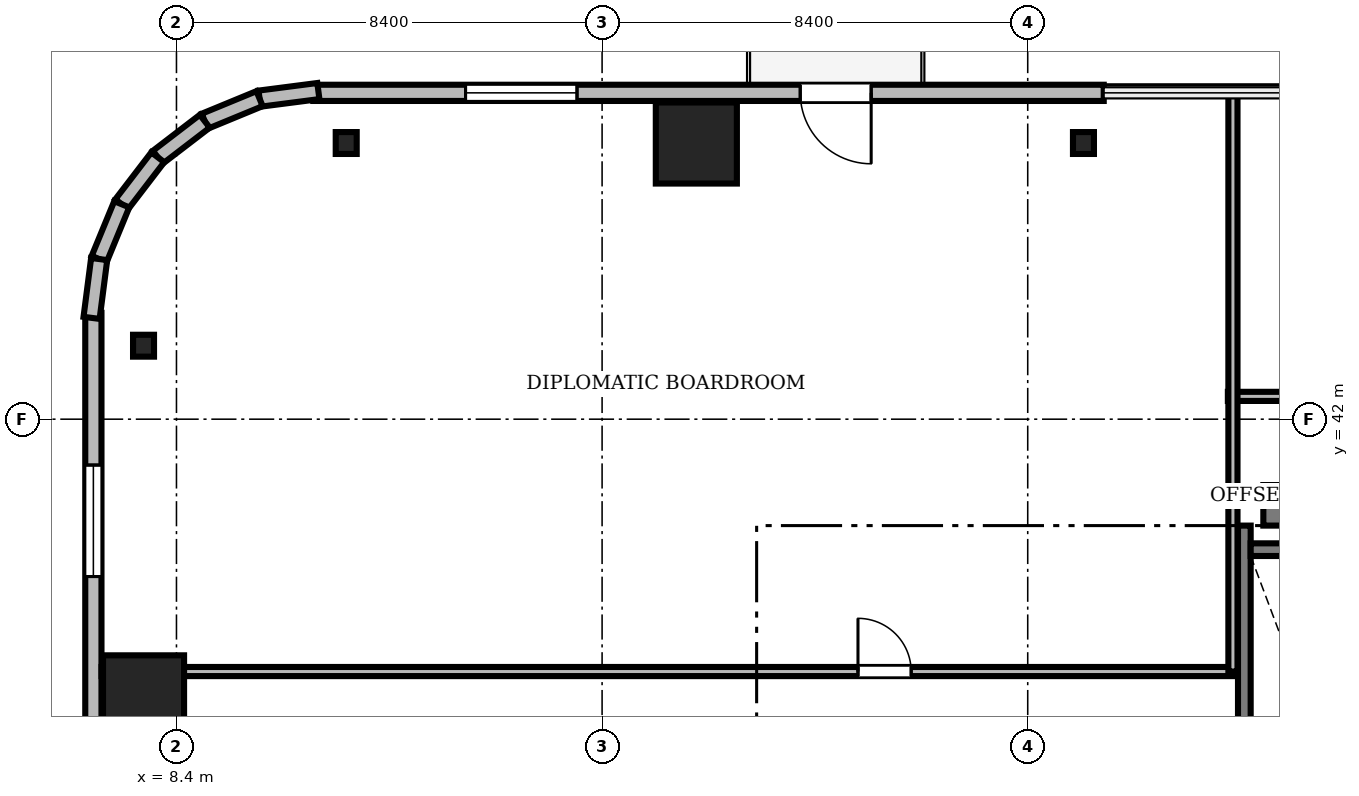
"""IFC4 building model, lengths in metres.
Left out: names, types, materials, properties, quantities, classifications, styles, units other than length and angle.
Written with IfcOpenShell. Run it as: python <this file> out.ifc"""

import sys

from ifc_helpers import new_model, si_unit, direction, frame, frame_2d, origin, origin_2d, place, context, subcontext, project, spatial, rectangle, i_section, extrude, source, transform, mapped, element, fill, save


model = new_model("IFC4")
c1 = context("Model", 3, precision=1e-05, world=origin(), true_north=direction((0.0, 1.0)))
c2 = subcontext(c1, "Body", "Model", "MODEL_VIEW")
j1 = project(units=[si_unit("LENGTHUNIT", "METRE"), si_unit("PLANEANGLEUNIT", "RADIAN")], contexts=[c1])
p1 = place(None, origin())
s1 = spatial("IfcSite", under=j1, at=p1, CompositionType="ELEMENT")
p2 = place(p1, origin())
s2 = spatial("IfcBuilding", under=s1, at=p2, CompositionType="ELEMENT")
p3 = place(p2, frame((0.0, 0.0, 137.2)))
s3 = spatial("IfcBuildingStorey", under=s2, at=p3, CompositionType="ELEMENT", Elevation=137.2)
m1 = source(origin(), c2, "Body", "SweptSolid", [
    extrude(rectangle(XDim=17.52, YDim=0.8, at=frame_2d((8.76, 0.0))), origin(), (0.0, 0.0, 1.0), 3.46),
])
p4 = place(p3, frame((29.85, 40.3, 0.0), z_axis=(0.0, 0.0, 1.0), x_axis=(1.0, 0.0, 0.0)))
e1 = element("IfcWall", 1, at=p4, inside=s3, PredefinedType="SHEAR", context=c2, shape_type="MappedRepresentation", body=[
    mapped(m1, transform((0.0, 0.0, 0.0), scale=1.0)),
])
m2 = source(origin(), c2, "Body", "SweptSolid", [
    extrude(rectangle(XDim=1.6, YDim=1.6, at=origin_2d()), origin(), (0.0, 0.0, 1.0), 3.46),
])
for number, where, z_axis, x_axis in (
    (2, (18.66, 47.45, 0.0), (0.0, 0.0, 1.0), (1.0, 0.0, 0.0)),
    (3, (7.75, 36.54, 0.0), (0.0, 0.0, 1.0), (1.0, 0.0, 0.0)),
):
    element("IfcColumn", number, at=place(p3, frame(where, z_axis=z_axis, x_axis=x_axis)), inside=s3, PredefinedType="COLUMN", context=c2, shape_type="MappedRepresentation", body=[
        mapped(m2, transform((0.0, 0.0, 0.0), scale=1.0)),
    ])
m3 = source(origin(), c2, "Body", "SweptSolid", [
    extrude(i_section(OverallWidth=0.414, OverallDepth=0.432, WebThickness=0.026, FlangeThickness=0.04, FilletRadius=0.015, at=origin_2d()), origin(), (0.0, 0.0, 1.0), 3.46),
])
for number, where, z_axis, x_axis in (
    (4, (26.3, 47.45, 0.0), (0.0, 0.0, 1.0), (1.0, 0.0, 0.0)),
    (5, (11.75, 47.45, 0.0), (0.0, 0.0, 1.0), (1.0, 0.0, 0.0)),
    (6, (7.75, 43.45, 0.0), (0.0, 0.0, 1.0), (1.0, 0.0, 0.0)),
):
    element("IfcColumn", number, at=place(p3, frame(where, z_axis=z_axis, x_axis=x_axis)), inside=s3, PredefinedType="COLUMN", context=c2, shape_type="MappedRepresentation", body=[
        mapped(m3, transform((0.0, 0.0, 0.0), scale=1.0)),
    ])
m4 = source(origin(), c2, "Body", "SweptSolid", [
    extrude(rectangle(XDim=15.6, YDim=0.32, at=frame_2d((7.8, 0.0))), origin(), (0.0, 0.0, 1.0), 3.46),
])
p5 = place(p3, frame((26.7, 48.44, 0.0), z_axis=(0.0, 0.0, 1.0), x_axis=(-1.0, 0.0, 0.0)))
e7 = element("IfcWall", 7, at=p5, inside=s3, PredefinedType="SOLIDWALL", context=c2, shape_type="MappedRepresentation", body=[
    mapped(m4, transform((0.0, 0.0, 0.0), scale=1.0)),
])
m5 = source(origin(), c2, "Body", "SweptSolid", [
    extrude(rectangle(XDim=1.4, YDim=2.3, at=frame_2d((0.7, 1.15))), frame((0.0, 0.17, 0.0), z_axis=(0.0, -1.0, 0.0), x_axis=(1.0, 0.0, 0.0)), (0.0, 0.0, 1.0), 0.34),
])
p6 = place(p5, frame((4.59, 0.0, 0.0)))
e8 = element("IfcOpeningElement", 8, at=p6, cuts=e7, PredefinedType="OPENING", context=c2, shape_type="MappedRepresentation", body=[
    mapped(m5, transform((0.0, 0.0, 0.0), scale=1.0)),
])
m6 = source(origin(), c2, "Body", "SweptSolid", [
    extrude(rectangle(XDim=2.2, YDim=2.4, at=frame_2d((1.1, 1.2))), frame((0.0, 0.17, 0.0), z_axis=(0.0, -1.0, 0.0), x_axis=(1.0, 0.0, 0.0)), (0.0, 0.0, 1.0), 0.34),
])
p7 = place(p5, frame((10.395, 0.0, 0.72)))
e9 = element("IfcOpeningElement", 9, at=p7, cuts=e7, PredefinedType="OPENING", context=c2, shape_type="MappedRepresentation", body=[
    mapped(m6, transform((0.0, 0.0, 0.0), scale=1.0)),
])
m7 = source(origin(), c2, "Body", "SweptSolid", [
    extrude(rectangle(XDim=15.6, YDim=0.32, at=frame_2d((7.8, 0.0))), origin(), (0.0, 0.0, 1.0), 3.46),
])
p8 = place(p3, frame((6.76, 44.1, 0.0), z_axis=(0.0, 0.0, 1.0), x_axis=(0.0, -1.0, 0.0)))
e10 = element("IfcWall", 10, at=p8, inside=s3, PredefinedType="SOLIDWALL", context=c2, shape_type="MappedRepresentation", body=[
    mapped(m7, transform((0.0, 0.0, 0.0), scale=1.0)),
])
p9 = place(p8, frame((3.005, 0.0, 0.72)))
e11 = element("IfcOpeningElement", 11, at=p9, cuts=e10, PredefinedType="OPENING", context=c2, shape_type="MappedRepresentation", body=[
    mapped(m6, transform((0.0, 0.0, 0.0), scale=1.0)),
])
m8 = source(origin(), c2, "Body", "SweptSolid", [
    extrude(rectangle(XDim=1.17, YDim=0.32, at=frame_2d((0.585, 0.0))), origin(), (0.0, 0.0, 1.0), 3.46),
])
p10 = place(p3, frame((11.2, 48.476, 0.0), z_axis=(0.0, 0.0, 1.0), x_axis=(-0.991735963317, -0.128295670475, 0.0)))
e12 = element("IfcWall", 12, at=p10, inside=s3, PredefinedType="SOLIDWALL", context=c2, shape_type="MappedRepresentation", body=[
    mapped(m8, transform((0.0, 0.0, 0.0), scale=1.0)),
])
m9 = source(origin(), c2, "Body", "SweptSolid", [
    extrude(rectangle(XDim=1.169, YDim=0.32, at=frame_2d((0.584, 0.0))), origin(), (0.0, 0.0, 1.0), 3.46),
])
p11 = place(p3, frame((10.04, 48.325, 0.0), z_axis=(0.0, 0.0, 1.0), x_axis=(-0.924552646638, -0.381054331552, 0.0)))
e13 = element("IfcWall", 13, at=p11, inside=s3, PredefinedType="SOLIDWALL", context=c2, shape_type="MappedRepresentation", body=[
    mapped(m9, transform((0.0, 0.0, 0.0), scale=1.0)),
])
m10 = source(origin(), c2, "Body", "SweptSolid", [
    extrude(rectangle(XDim=1.169, YDim=0.32, at=frame_2d((0.584, 0.0))), origin(), (0.0, 0.0, 1.0), 3.46),
])
p12 = place(p3, frame((8.959, 47.88, 0.0), z_axis=(0.0, 0.0, 1.0), x_axis=(-0.793663520347, -0.608356981114, 0.0)))
e14 = element("IfcWall", 14, at=p12, inside=s3, PredefinedType="SOLIDWALL", context=c2, shape_type="MappedRepresentation", body=[
    mapped(m10, transform((0.0, 0.0, 0.0), scale=1.0)),
])
m11 = source(origin(), c2, "Body", "SweptSolid", [
    extrude(rectangle(XDim=1.169, YDim=0.32, at=frame_2d((0.584, 0.0))), origin(), (0.0, 0.0, 1.0), 3.46),
])
p13 = place(p3, frame((8.031, 47.169, 0.0), z_axis=(0.0, 0.0, 1.0), x_axis=(-0.608387696831, -0.793639975269, 0.0)))
e15 = element("IfcWall", 15, at=p13, inside=s3, PredefinedType="SOLIDWALL", context=c2, shape_type="MappedRepresentation", body=[
    mapped(m11, transform((0.0, 0.0, 0.0), scale=1.0)),
])
p14 = place(p3, frame((7.32, 46.241, 0.0), z_axis=(0.0, 0.0, 1.0), x_axis=(-0.381054331552, -0.924552646638, 0.0)))
e16 = element("IfcWall", 16, at=p14, inside=s3, PredefinedType="SOLIDWALL", context=c2, shape_type="MappedRepresentation", body=[
    mapped(m9, transform((0.0, 0.0, 0.0), scale=1.0)),
])
p15 = place(p3, frame((6.875, 45.16, 0.0), z_axis=(0.0, 0.0, 1.0), x_axis=(-0.128295670475, -0.991735963317, 0.0)))
e17 = element("IfcWall", 17, at=p15, inside=s3, PredefinedType="SOLIDWALL", context=c2, shape_type="MappedRepresentation", body=[
    mapped(m8, transform((0.0, 0.0, 0.0), scale=1.0)),
])
m12 = source(origin(), c2, "Body", "SweptSolid", [
    extrude(rectangle(XDim=9.25, YDim=0.25, at=frame_2d((4.625, 0.0))), origin(), (0.0, 0.0, 1.0), 3.5),
])
p16 = place(p3, frame((29.475, 30.65, 0.0), z_axis=(0.0, 0.0, 1.0), x_axis=(0.0, 1.0, 0.0)))
e18 = element("IfcWall", 18, at=p16, inside=s3, PredefinedType="SOLIDWALL", context=c2, shape_type="MappedRepresentation", body=[
    mapped(m12, transform((0.0, 0.0, 0.0), scale=1.0)),
])
m13 = source(origin(), c2, "Body", "SweptSolid", [
    extrude(rectangle(XDim=3.15, YDim=0.25, at=frame_2d((1.575, 0.0))), origin(), (0.0, 0.0, 1.0), 3.5),
])
p17 = place(p3, frame((29.6, 39.425, 0.0), z_axis=(0.0, 0.0, 1.0), x_axis=(1.0, 0.0, 0.0)))
e19 = element("IfcWall", 19, at=p17, inside=s3, PredefinedType="SOLIDWALL", context=c2, shape_type="MappedRepresentation", body=[
    mapped(m13, transform((0.0, 0.0, 0.0), scale=1.0)),
])
m14 = source(origin(), c2, "Body", "SweptSolid", [
    extrude(rectangle(XDim=23.928, YDim=0.18, at=frame_2d((11.964, 0.0))), origin(), (0.0, 0.0, 1.0), 2.702),
])
p18 = place(p3, frame((29.15, 42.45, 0.0), z_axis=(0.0, 0.0, 1.0), x_axis=(1.0, 0.0, 0.0)))
e20 = element("IfcWall", 20, at=p18, inside=s3, PredefinedType="PARTITIONING", context=c2, shape_type="MappedRepresentation", body=[
    mapped(m14, transform((0.0, 0.0, 0.0), scale=1.0)),
])
m15 = source(origin(), c2, "Body", "SweptSolid", [
    extrude(rectangle(XDim=1.05, YDim=2.2, at=frame_2d((0.525, 1.1))), frame((0.0, 0.1, 0.0), z_axis=(0.0, -1.0, 0.0), x_axis=(1.0, 0.0, 0.0)), (0.0, 0.0, 1.0), 0.2),
])
p19 = place(p18, frame((4.5, 0.0, 0.0)))
e21 = element("IfcOpeningElement", 21, at=p19, cuts=e20, PredefinedType="OPENING", context=c2, shape_type="MappedRepresentation", body=[
    mapped(m15, transform((0.0, 0.0, 0.0), scale=1.0)),
])
m16 = source(origin(), c2, "Body", "SweptSolid", [
    extrude(rectangle(XDim=22.328, YDim=0.18, at=frame_2d((11.164, 0.0))), origin(), (0.0, 0.0, 1.0), 2.702),
])
p20 = place(p3, frame((6.922, 37.02, 0.0), z_axis=(0.0, 0.0, 1.0), x_axis=(1.0, 0.0, 0.0)))
e22 = element("IfcWall", 22, at=p20, inside=s3, PredefinedType="PARTITIONING", context=c2, shape_type="MappedRepresentation", body=[
    mapped(m16, transform((0.0, 0.0, 0.0), scale=1.0)),
])
p21 = place(p20, frame((14.928, 0.0, 0.0)))
e23 = element("IfcOpeningElement", 23, at=p21, cuts=e22, PredefinedType="OPENING", context=c2, shape_type="MappedRepresentation", body=[
    mapped(m15, transform((0.0, 0.0, 0.0), scale=1.0)),
])
m17 = source(origin(), c2, "Body", "SweptSolid", [
    extrude(rectangle(XDim=11.45, YDim=0.18, at=frame_2d((5.725, 0.0))), origin(), (0.0, 0.0, 1.0), 2.702),
])
p22 = place(p3, frame((29.25, 37.02, 0.0), z_axis=(0.0, 0.0, 1.0), x_axis=(0.0, 1.0, 0.0)))
e24 = element("IfcWall", 24, at=p22, inside=s3, PredefinedType="PARTITIONING", context=c2, shape_type="MappedRepresentation", body=[
    mapped(m17, transform((0.0, 0.0, 0.0), scale=1.0)),
])
m18 = source(origin(), c2, "Body", "SweptSolid", [
    extrude(rectangle(XDim=1.4, YDim=2.3, at=frame_2d((0.7, 1.15))), frame((0.0, 0.025, 0.0), z_axis=(0.0, -1.0, 0.0), x_axis=(1.0, 0.0, 0.0)), (0.0, 0.0, 1.0), 0.05),
])
p23 = place(p6, frame((1.4, 0.0, 0.0), z_axis=(0.0, 0.0, 1.0), x_axis=(-1.0, 0.0, 0.0)))
e25 = element("IfcDoor", 25, at=p23, inside=s3, OperationType="DOUBLE_DOOR_SLIDING", PredefinedType="DOOR", context=c2, shape_type="MappedRepresentation", body=[
    mapped(m18, transform((0.0, 0.0, 0.0), scale=1.0)),
])
fill(e8, e25)
m19 = source(origin(), c2, "Body", "SweptSolid", [
    extrude(rectangle(XDim=2.2, YDim=2.4, at=frame_2d((1.1, 1.2))), frame((0.0, 0.03, 0.0), z_axis=(0.0, -1.0, 0.0), x_axis=(1.0, 0.0, 0.0)), (0.0, 0.0, 1.0), 0.06),
])
p24 = place(p7, origin())
e26 = element("IfcWindow", 26, at=p24, inside=s3, PartitioningType="SINGLE_PANEL", PredefinedType="WINDOW", context=c2, shape_type="MappedRepresentation", body=[
    mapped(m19, transform((0.0, 0.0, 0.0), scale=1.0)),
])
fill(e9, e26)
p25 = place(p9, origin())
e27 = element("IfcWindow", 27, at=p25, inside=s3, PartitioningType="SINGLE_PANEL", PredefinedType="WINDOW", context=c2, shape_type="MappedRepresentation", body=[
    mapped(m19, transform((0.0, 0.0, 0.0), scale=1.0)),
])
fill(e11, e27)
m20 = source(origin(), c2, "Body", "SweptSolid", [
    extrude(rectangle(XDim=1.05, YDim=2.2, at=frame_2d((0.525, 1.1))), frame((0.0, 0.025, 0.0), z_axis=(0.0, -1.0, 0.0), x_axis=(1.0, 0.0, 0.0)), (0.0, 0.0, 1.0), 0.05),
])
p26 = place(p21, origin())
e28 = element("IfcDoor", 28, at=p26, inside=s3, OperationType="SINGLE_SWING_LEFT", PredefinedType="DOOR", context=c2, shape_type="MappedRepresentation", body=[
    mapped(m20, transform((0.0, 0.0, 0.0), scale=1.0)),
])
fill(e23, e28)
save(model, sys.argv[1])
